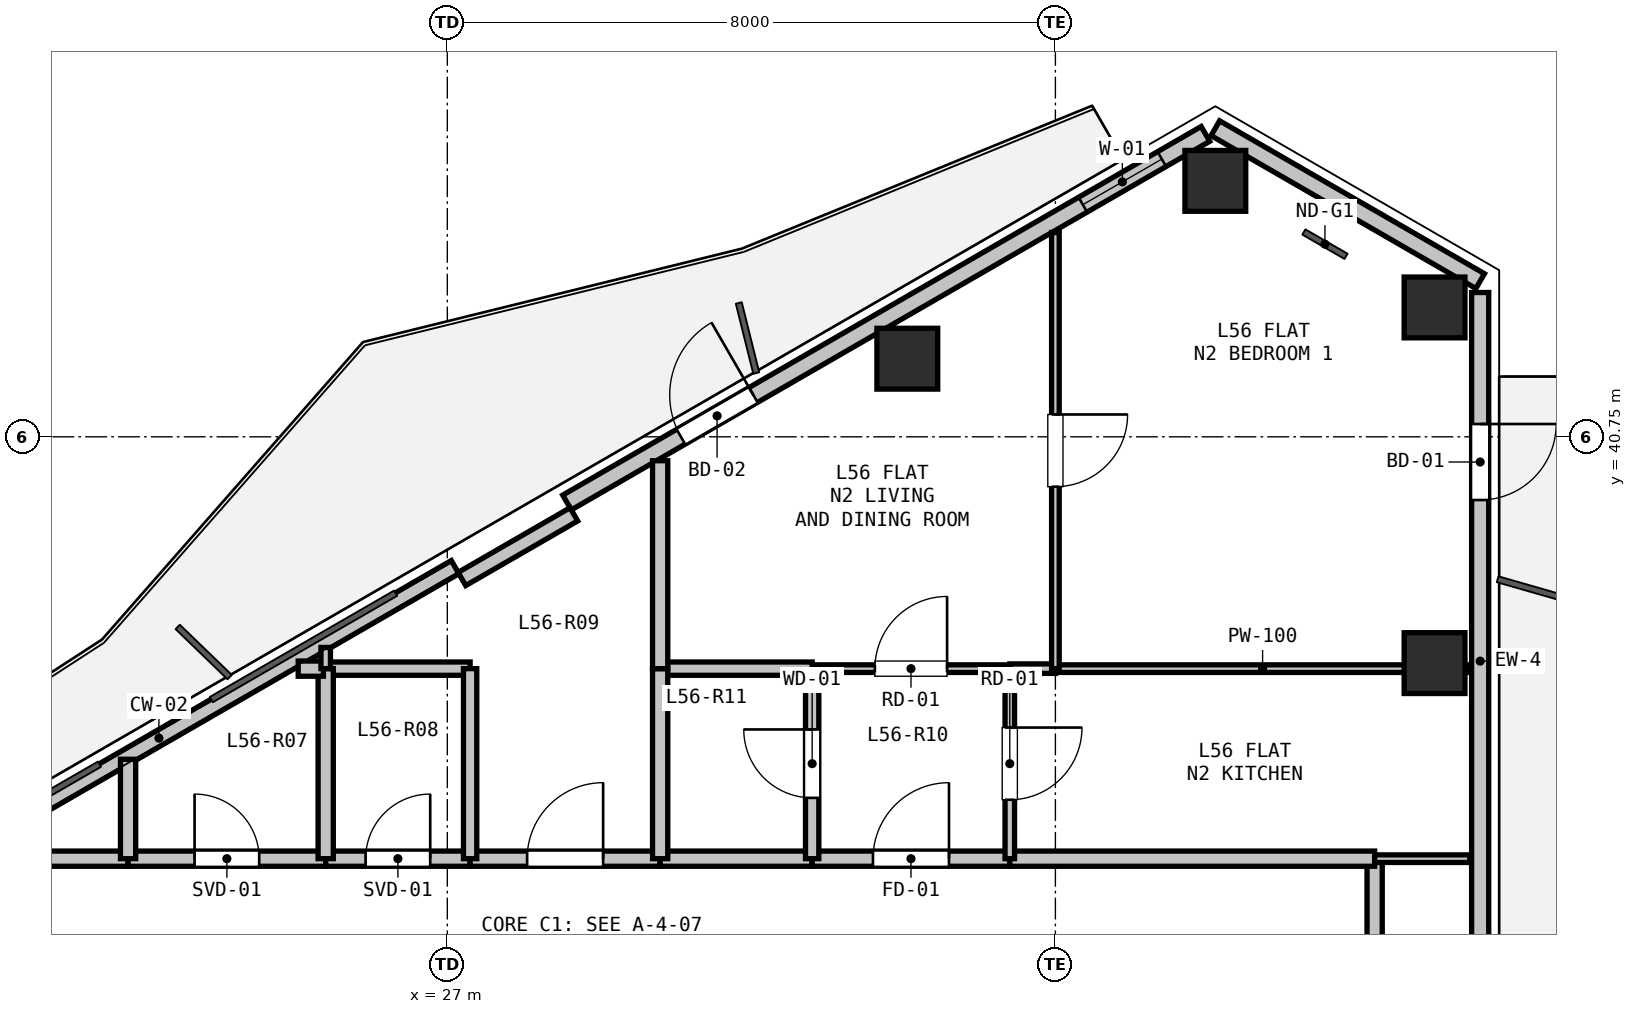
"""IFC4 building model, lengths in metres.
Left out: names, types, materials, properties, quantities, classifications, styles, units other than length and angle.
Written with IfcOpenShell. Run it as: python <this file> out.ifc"""

import sys

from ifc_helpers import new_model, si_unit, direction, frame, frame_2d, origin, origin_2d, place, context, subcontext, project, spatial, rectangle, hollow_rectangle, extrude, element, fill, save


model = new_model("IFC4")
c1 = context("Model", 3, precision=1e-05, world=origin(), true_north=direction((0.0, 1.0)))
c2 = subcontext(c1, "Body", "Model", "MODEL_VIEW")
j1 = project(units=[si_unit("LENGTHUNIT", "METRE"), si_unit("PLANEANGLEUNIT", "RADIAN")], contexts=[c1])
p1 = place(None, origin())
s1 = spatial("IfcSite", under=j1, at=p1, CompositionType="ELEMENT")
p2 = place(p1, origin())
s2 = spatial("IfcBuilding", under=s1, at=p2, CompositionType="ELEMENT")
p3 = place(p2, frame((0.0, 0.0, 201.9)))
s3 = spatial("IfcBuildingStorey", under=s2, at=p3, CompositionType="ELEMENT", Elevation=201.9)
for number, where, z_axis, x_axis in (
    (1, (33.052, 41.778, 0.0), (0.0, 0.0, 1.0), (1.0, 0.0, 0.0)),
    (2, (37.104, 44.117, 0.0), (0.0, 0.0, 1.0), (1.0, 0.0, 0.0)),
    (3, (39.988, 42.452, 0.0), (0.0, 0.0, 1.0), (1.0, 0.0, 0.0)),
    (4, (39.988, 37.773, 0.0), (0.0, 0.0, 1.0), (1.0, 0.0, 0.0)),
):
    element("IfcColumn", number, at=place(p3, frame(where, z_axis=z_axis, x_axis=x_axis)), inside=s3, PredefinedType="COLUMN", context=c2, shape_type="SweptSolid", body=[
        extrude(hollow_rectangle(XDim=0.8, YDim=0.8, WallThickness=0.025, at=origin_2d()), origin(), (0.0, 0.0, 1.0), 3.3),
    ])
p4 = place(p3, frame((37.104, 44.81, 0.0), z_axis=(0.0, 0.0, 1.0), x_axis=(0.866023907196, -0.500002592159, 0.0)))
e5 = element("IfcWall", 5, at=p4, inside=s3, PredefinedType="SOLIDWALL", context=c2, shape_type="SweptSolid", body=[
    extrude(rectangle(XDim=4.023, YDim=0.225, at=frame_2d((2.012, 0.0))), origin(), (0.0, 0.0, 1.0), 2.69),
])
p5 = place(p3, frame((19.309, 34.536, 0.0), z_axis=(0.0, 0.0, 1.0), x_axis=(0.866020680503, 0.500008180874, 0.0)))
e6 = element("IfcWall", 6, at=p5, inside=s3, PredefinedType="PARAPET", context=c2, shape_type="SweptSolid", body=[
    extrude(rectangle(XDim=8.999, YDim=0.2, at=frame_2d((4.5, 0.0))), origin(), (0.0, 0.0, 1.0), 0.2),
])
p6 = place(p3, frame((28.575, 39.885, 0.0), z_axis=(0.0, 0.0, 1.0), x_axis=(0.866016233231, 0.500015883528, 0.0)))
e7 = element("IfcWall", 7, at=p6, inside=s3, PredefinedType="SOLIDWALL", context=c2, shape_type="SweptSolid", body=[
    extrude(rectangle(XDim=9.699, YDim=0.225, at=frame_2d((4.85, 0.0))), origin(), (0.0, 0.0, 1.0), 2.69),
])
p7 = place(p6, frame((1.73, 0.0, 0.0)))
e8 = element("IfcOpeningElement", 8, at=p7, cuts=e7, PredefinedType="OPENING", context=c2, shape_type="SweptSolid", body=[
    extrude(rectangle(XDim=1.1, YDim=2.1, at=frame_2d((0.55, 1.05))), frame((0.0, 0.123, 0.0), z_axis=(0.0, -1.0, 0.0), x_axis=(1.0, 0.0, 0.0)), (0.0, 0.0, 1.0), 0.245),
])
p8 = place(p6, frame((7.836, 0.0, 0.9)))
e9 = element("IfcOpeningElement", 9, at=p8, cuts=e7, PredefinedType="OPENING", context=c2, shape_type="SweptSolid", body=[
    extrude(rectangle(XDim=1.2, YDim=1.4, at=frame_2d((0.6, 0.7))), frame((0.0, 0.123, 0.0), z_axis=(0.0, -1.0, 0.0), x_axis=(1.0, 0.0, 0.0)), (0.0, 0.0, 1.0), 0.245),
])
p9 = place(p3, frame((27.192, 38.88, 0.0), z_axis=(0.0, 0.0, 1.0), x_axis=(0.866025371046, 0.500000056704, 0.0)))
e10 = element("IfcWall", 10, at=p9, inside=s3, PredefinedType="PARAPET", context=c2, shape_type="SweptSolid", body=[
    extrude(rectangle(XDim=1.7, YDim=0.2, at=frame_2d((0.85, 0.0))), origin(), (0.0, 0.0, 1.0), 2.69),
])
p10 = place(p3, frame((40.588, 42.648, 0.0), z_axis=(0.0, 0.0, 1.0), x_axis=(0.0, -1.0, 0.0)))
e11 = element("IfcWall", 11, at=p10, inside=s3, PredefinedType="SOLIDWALL", context=c2, shape_type="SweptSolid", body=[
    extrude(rectangle(XDim=9.699, YDim=0.225, at=frame_2d((4.85, 0.0))), origin(), (0.0, 0.0, 1.0), 2.69),
])
p11 = place(p10, frame((1.73, 0.0, 0.0)))
e12 = element("IfcOpeningElement", 12, at=p11, cuts=e11, PredefinedType="OPENING", context=c2, shape_type="SweptSolid", body=[
    extrude(rectangle(XDim=1.0, YDim=2.1, at=frame_2d((0.5, 1.05))), frame((0.0, 0.123, 0.0), z_axis=(0.0, -1.0, 0.0), x_axis=(1.0, 0.0, 0.0)), (0.0, 0.0, 1.0), 0.245),
])
p12 = place(p3, frame((39.2, 35.2, 0.0), z_axis=(0.0, 0.0, 1.0), x_axis=(0.0, -1.0, 0.0)))
e13 = element("IfcWall", 13, at=p12, inside=s3, PredefinedType="PARTITIONING", context=c2, shape_type="SweptSolid", body=[
    extrude(rectangle(XDim=1.6, YDim=0.2, at=frame_2d((0.8, 0.0))), origin(), (0.0, 0.0, 1.0), 3.07),
])
p13 = place(p3, frame((20.528, 35.2, 0.0), z_axis=(0.0, 0.0, 1.0), x_axis=(1.0, 0.0, 0.0)))
e14 = element("IfcWall", 14, at=p13, inside=s3, PredefinedType="PARTITIONING", context=c2, shape_type="SweptSolid", body=[
    extrude(rectangle(XDim=2.272, YDim=0.2, at=frame_2d((1.136, 0.0))), origin(), (0.0, 0.0, 1.0), 2.365),
])
p14 = place(p3, frame((22.8, 35.2, 0.0), z_axis=(0.0, 0.0, 1.0), x_axis=(1.0, 0.0, 0.0)))
e15 = element("IfcWall", 15, at=p14, inside=s3, PredefinedType="PARTITIONING", context=c2, shape_type="SweptSolid", body=[
    extrude(rectangle(XDim=2.6, YDim=0.2, at=frame_2d((1.3, 0.0))), origin(), (0.0, 0.0, 1.0), 3.07),
])
p15 = place(p14, frame((0.875, 0.0, 0.0)))
e16 = element("IfcOpeningElement", 16, at=p15, cuts=e15, PredefinedType="OPENING", context=c2, shape_type="SweptSolid", body=[
    extrude(rectangle(XDim=0.85, YDim=2.1, at=frame_2d((0.425, 1.05))), frame((0.0, 0.11, 0.0), z_axis=(0.0, -1.0, 0.0), x_axis=(1.0, 0.0, 0.0)), (0.0, 0.0, 1.0), 0.22),
])
p16 = place(p3, frame((25.4, 35.2, 0.0), z_axis=(0.0, 0.0, 1.0), x_axis=(1.0, 0.0, 0.0)))
e17 = element("IfcWall", 17, at=p16, inside=s3, PredefinedType="PARTITIONING", context=c2, shape_type="SweptSolid", body=[
    extrude(rectangle(XDim=1.9, YDim=0.2, at=frame_2d((0.95, 0.0))), origin(), (0.0, 0.0, 1.0), 3.07),
])
p17 = place(p16, frame((0.525, 0.0, 0.0)))
e18 = element("IfcOpeningElement", 18, at=p17, cuts=e17, PredefinedType="OPENING", context=c2, shape_type="SweptSolid", body=[
    extrude(rectangle(XDim=0.85, YDim=2.1, at=frame_2d((0.425, 1.05))), frame((0.0, 0.11, 0.0), z_axis=(0.0, -1.0, 0.0), x_axis=(1.0, 0.0, 0.0)), (0.0, 0.0, 1.0), 0.22),
])
p18 = place(p3, frame((27.3, 35.2, 0.0), z_axis=(0.0, 0.0, 1.0), x_axis=(1.0, 0.0, 0.0)))
e19 = element("IfcWall", 19, at=p18, inside=s3, PredefinedType="PARTITIONING", context=c2, shape_type="SweptSolid", body=[
    extrude(rectangle(XDim=2.5, YDim=0.2, at=frame_2d((1.25, 0.0))), origin(), (0.0, 0.0, 1.0), 3.07),
])
p19 = place(p18, frame((0.75, 0.0, 0.0)))
e20 = element("IfcOpeningElement", 20, at=p19, cuts=e19, PredefinedType="OPENING", context=c2, shape_type="SweptSolid", body=[
    extrude(rectangle(XDim=1.0, YDim=2.15, at=frame_2d((0.5, 1.075))), frame((0.0, 0.11, 0.0), z_axis=(0.0, -1.0, 0.0), x_axis=(1.0, 0.0, 0.0)), (0.0, 0.0, 1.0), 0.22),
])
p20 = place(p3, frame((29.8, 35.2, 0.0), z_axis=(0.0, 0.0, 1.0), x_axis=(1.0, 0.0, 0.0)))
e21 = element("IfcWall", 21, at=p20, inside=s3, PredefinedType="PARTITIONING", context=c2, shape_type="SweptSolid", body=[
    extrude(rectangle(XDim=2.0, YDim=0.2, at=frame_2d((1.0, 0.0))), origin(), (0.0, 0.0, 1.0), 3.07),
])
p21 = place(p3, frame((31.8, 35.2, 0.0), z_axis=(0.0, 0.0, 1.0), x_axis=(1.0, 0.0, 0.0)))
e22 = element("IfcWall", 22, at=p21, inside=s3, PredefinedType="PARTITIONING", context=c2, shape_type="SweptSolid", body=[
    extrude(rectangle(XDim=2.6, YDim=0.2, at=frame_2d((1.3, 0.0))), origin(), (0.0, 0.0, 1.0), 3.07),
])
p22 = place(p21, frame((0.8, 0.0, 0.0)))
e23 = element("IfcOpeningElement", 23, at=p22, cuts=e22, PredefinedType="OPENING", context=c2, shape_type="SweptSolid", body=[
    extrude(rectangle(XDim=1.0, YDim=2.15, at=frame_2d((0.5, 1.075))), frame((0.0, 0.11, 0.0), z_axis=(0.0, -1.0, 0.0), x_axis=(1.0, 0.0, 0.0)), (0.0, 0.0, 1.0), 0.22),
])
p23 = place(p3, frame((34.4, 35.2, 0.0), z_axis=(0.0, 0.0, 1.0), x_axis=(1.0, 0.0, 0.0)))
e24 = element("IfcWall", 24, at=p23, inside=s3, PredefinedType="PARTITIONING", context=c2, shape_type="SweptSolid", body=[
    extrude(rectangle(XDim=4.8, YDim=0.2, at=frame_2d((2.4, 0.0))), origin(), (0.0, 0.0, 1.0), 2.518),
])
p24 = place(p3, frame((31.8, 37.7, 0.0), z_axis=(0.0, 0.0, 1.0), x_axis=(1.0, 0.0, 0.0)))
e25 = element("IfcWall", 25, at=p24, inside=s3, PredefinedType="PARTITIONING", context=c2, shape_type="SweptSolid", body=[
    extrude(rectangle(XDim=2.6, YDim=0.1, at=frame_2d((1.3, 0.0))), origin(), (0.0, 0.0, 1.0), 3.07),
])
p25 = place(p24, frame((0.825, 0.0, 0.0)))
e26 = element("IfcOpeningElement", 26, at=p25, cuts=e25, PredefinedType="OPENING", context=c2, shape_type="SweptSolid", body=[
    extrude(rectangle(XDim=0.95, YDim=2.1, at=frame_2d((0.475, 1.05))), frame((0.0, 0.06, 0.0), z_axis=(0.0, -1.0, 0.0), x_axis=(1.0, 0.0, 0.0)), (0.0, 0.0, 1.0), 0.12),
])
p26 = place(p3, frame((34.4, 37.7, 0.0), z_axis=(0.0, 0.0, 1.0), x_axis=(0.0, -1.0, 0.0)))
e27 = element("IfcWall", 27, at=p26, inside=s3, PredefinedType="PARTITIONING", context=c2, shape_type="SweptSolid", body=[
    extrude(rectangle(XDim=2.5, YDim=0.125, at=frame_2d((1.25, 0.0))), origin(), (0.0, 0.0, 1.0), 3.07),
])
p27 = place(p26, frame((0.775, 0.0, 0.0)))
e28 = element("IfcOpeningElement", 28, at=p27, cuts=e27, PredefinedType="OPENING", context=c2, shape_type="SweptSolid", body=[
    extrude(rectangle(XDim=0.95, YDim=2.1, at=frame_2d((0.475, 1.05))), frame((0.0, 0.073, 0.0), z_axis=(0.0, -1.0, 0.0), x_axis=(1.0, 0.0, 0.0)), (0.0, 0.0, 1.0), 0.145),
])
p28 = place(p3, frame((31.8, 35.2, 0.0), z_axis=(0.0, 0.0, 1.0), x_axis=(0.0, 1.0, 0.0)))
e29 = element("IfcWall", 29, at=p28, inside=s3, PredefinedType="PLUMBINGWALL", context=c2, shape_type="SweptSolid", body=[
    extrude(rectangle(XDim=2.5, YDim=0.175, at=frame_2d((1.25, 0.0))), origin(), (0.0, 0.0, 1.0), 3.07),
])
p29 = place(p28, frame((0.8, 0.0, 0.0)))
e30 = element("IfcOpeningElement", 30, at=p29, cuts=e29, PredefinedType="OPENING", context=c2, shape_type="SweptSolid", body=[
    extrude(rectangle(XDim=0.9, YDim=2.1, at=frame_2d((0.45, 1.05))), frame((0.0, 0.097, 0.0), z_axis=(0.0, -1.0, 0.0), x_axis=(1.0, 0.0, 0.0)), (0.0, 0.0, 1.0), 0.195),
])
p30 = place(p3, frame((25.4, 37.7, 0.0), z_axis=(0.0, 0.0, 1.0), x_axis=(1.0, 0.0, 0.0)))
e31 = element("IfcWall", 31, at=p30, inside=s3, PredefinedType="PLUMBINGWALL", context=c2, shape_type="SweptSolid", body=[
    extrude(rectangle(XDim=1.9, YDim=0.175, at=frame_2d((0.95, 0.0))), origin(), (0.0, 0.0, 1.0), 2.365),
])
p31 = place(p3, frame((27.3, 37.7, 0.0), z_axis=(0.0, 0.0, 1.0), x_axis=(0.0, -1.0, 0.0)))
e32 = element("IfcWall", 32, at=p31, inside=s3, PredefinedType="PLUMBINGWALL", context=c2, shape_type="SweptSolid", body=[
    extrude(rectangle(XDim=2.5, YDim=0.175, at=frame_2d((1.25, 0.0))), origin(), (0.0, 0.0, 1.0), 3.07),
])
p32 = place(p3, frame((25.4, 35.2, 0.0), z_axis=(0.0, 0.0, 1.0), x_axis=(0.0, 1.0, 0.0)))
e33 = element("IfcWall", 33, at=p32, inside=s3, PredefinedType="PARTITIONING", context=c2, shape_type="SweptSolid", body=[
    extrude(rectangle(XDim=2.5, YDim=0.2, at=frame_2d((1.25, 0.0))), origin(), (0.0, 0.0, 1.0), 2.365),
])
p33 = place(p3, frame((29.8, 37.7, 0.0), z_axis=(0.0, 0.0, 1.0), x_axis=(1.0, 0.0, 0.0)))
e34 = element("IfcWall", 34, at=p33, inside=s3, PredefinedType="PLUMBINGWALL", context=c2, shape_type="SweptSolid", body=[
    extrude(rectangle(XDim=2.0, YDim=0.175, at=frame_2d((1.0, 0.0))), origin(), (0.0, 0.0, 1.0), 3.07),
])
p34 = place(p3, frame((29.8, 35.2, 0.0), z_axis=(0.0, 0.0, 1.0), x_axis=(0.0, 1.0, 0.0)))
e35 = element("IfcWall", 35, at=p34, inside=s3, PredefinedType="PARTITIONING", context=c2, shape_type="SweptSolid", body=[
    extrude(rectangle(XDim=2.5, YDim=0.2, at=frame_2d((1.25, 0.0))), origin(), (0.0, 0.0, 1.0), 3.07),
])
p35 = place(p3, frame((40.452, 35.2, 0.0), z_axis=(0.0, 0.0, 1.0), x_axis=(-1.0, 0.0, 0.0)))
e36 = element("IfcWall", 36, at=p35, inside=s3, PredefinedType="PARTITIONING", context=c2, shape_type="SweptSolid", body=[
    extrude(rectangle(XDim=1.252, YDim=0.1, at=frame_2d((0.626, 0.0))), origin(), (0.0, 0.0, 1.0), 2.365),
])
p36 = place(p3, frame((34.4, 37.7, 0.0), z_axis=(0.0, 0.0, 1.0), x_axis=(1.0, 0.0, 0.0)))
e37 = element("IfcWall", 37, at=p36, inside=s3, PredefinedType="PARTITIONING", context=c2, shape_type="SweptSolid", body=[
    extrude(rectangle(XDim=0.6, YDim=0.125, at=frame_2d((0.3, 0.0))), origin(), (0.0, 0.0, 1.0), 3.07),
])
p37 = place(p3, frame((35.0, 37.7, 0.0), z_axis=(0.0, 0.0, 1.0), x_axis=(1.0, 0.0, 0.0)))
e38 = element("IfcWall", 38, at=p37, inside=s3, PredefinedType="PARTITIONING", context=c2, shape_type="SweptSolid", body=[
    extrude(rectangle(XDim=5.452, YDim=0.1, at=frame_2d((2.726, 0.0))), origin(), (0.0, 0.0, 1.0), 2.518),
])
p38 = place(p3, frame((25.038, 37.7, 0.0), z_axis=(0.0, 0.0, 1.0), x_axis=(1.0, 0.0, 0.0)))
e39 = element("IfcWall", 39, at=p38, inside=s3, PredefinedType="PARTITIONING", context=c2, shape_type="SweptSolid", body=[
    extrude(rectangle(XDim=0.332, YDim=0.2, at=frame_2d((0.166, 0.0))), origin(), (0.0, 0.0, 1.0), 3.07),
])
p39 = place(p3, frame((22.8, 35.2, 0.0), z_axis=(0.0, 0.0, 1.0), x_axis=(0.0, 1.0, 0.0)))
e40 = element("IfcWall", 40, at=p39, inside=s3, PredefinedType="PARTITIONING", context=c2, shape_type="SweptSolid", body=[
    extrude(rectangle(XDim=1.308, YDim=0.2, at=frame_2d((0.654, 0.0))), origin(), (0.0, 0.0, 1.0), 2.365),
])
p40 = place(p3, frame((29.8, 40.435, 0.0), z_axis=(0.0, 0.0, 1.0), x_axis=(0.0, -1.0, 0.0)))
e41 = element("IfcWall", 41, at=p40, inside=s3, PredefinedType="PARTITIONING", context=c2, shape_type="SweptSolid", body=[
    extrude(rectangle(XDim=2.735, YDim=0.2, at=frame_2d((1.368, 0.0))), origin(), (0.0, 0.0, 1.0), 2.365),
])
p41 = place(p3, frame((25.4, 37.7, 0.0), z_axis=(0.0, 0.0, 1.0), x_axis=(0.0, 1.0, 0.0)))
e42 = element("IfcWall", 42, at=p41, inside=s3, PredefinedType="PARTITIONING", context=c2, shape_type="SweptSolid", body=[
    extrude(rectangle(XDim=0.279, YDim=0.125, at=frame_2d((0.139, 0.0))), origin(), (0.0, 0.0, 1.0), 3.07),
])
p42 = place(p3, frame((35.0, 43.438, 0.0), z_axis=(0.0, 0.0, 1.0), x_axis=(0.0, -1.0, 0.0)))
e43 = element("IfcWall", 43, at=p42, inside=s3, PredefinedType="PARTITIONING", context=c2, shape_type="SweptSolid", body=[
    extrude(rectangle(XDim=5.738, YDim=0.1, at=frame_2d((2.869, 0.0))), origin(), (0.0, 0.0, 1.0), 2.795),
])
p43 = place(p42, frame((2.394, 0.0, 0.0)))
e44 = element("IfcOpeningElement", 44, at=p43, cuts=e43, PredefinedType="OPENING", context=c2, shape_type="SweptSolid", body=[
    extrude(rectangle(XDim=0.95, YDim=2.1, at=frame_2d((0.475, 1.05))), frame((0.0, 0.06, 0.0), z_axis=(0.0, -1.0, 0.0), x_axis=(1.0, 0.0, 0.0)), (0.0, 0.0, 1.0), 0.12),
])
p44 = place(p7, origin())
e45 = element("IfcDoor", 45, at=p44, inside=s3, OperationType="SINGLE_SWING_RIGHT", PredefinedType="DOOR", context=c2, shape_type="SweptSolid", body=[
    extrude(rectangle(XDim=1.1, YDim=2.1, at=frame_2d((0.55, 1.05))), frame((0.0, 0.025, 0.0), z_axis=(0.0, -1.0, 0.0), x_axis=(1.0, 0.0, 0.0)), (0.0, 0.0, 1.0), 0.05),
])
fill(e8, e45)
p45 = place(p8, origin())
e46 = element("IfcWindow", 46, at=p45, inside=s3, PartitioningType="SINGLE_PANEL", PredefinedType="WINDOW", context=c2, shape_type="SweptSolid", body=[
    extrude(rectangle(XDim=1.2, YDim=1.4, at=frame_2d((0.6, 0.7))), frame((0.0, 0.03, 0.0), z_axis=(0.0, -1.0, 0.0), x_axis=(1.0, 0.0, 0.0)), (0.0, 0.0, 1.0), 0.06),
])
fill(e9, e46)
p46 = place(p11, origin())
e47 = element("IfcDoor", 47, at=p46, inside=s3, OperationType="SINGLE_SWING_LEFT", PredefinedType="DOOR", context=c2, shape_type="SweptSolid", body=[
    extrude(rectangle(XDim=1.0, YDim=2.1, at=frame_2d((0.5, 1.05))), frame((0.0, 0.025, 0.0), z_axis=(0.0, -1.0, 0.0), x_axis=(1.0, 0.0, 0.0)), (0.0, 0.0, 1.0), 0.05),
])
fill(e12, e47)
p47 = place(p22, origin())
e48 = element("IfcDoor", 48, at=p47, inside=s3, OperationType="SINGLE_SWING_RIGHT", PredefinedType="DOOR", context=c2, shape_type="SweptSolid", body=[
    extrude(rectangle(XDim=1.0, YDim=2.15, at=frame_2d((0.5, 1.075))), frame((0.0, 0.025, 0.0), z_axis=(0.0, -1.0, 0.0), x_axis=(1.0, 0.0, 0.0)), (0.0, 0.0, 1.0), 0.05),
])
fill(e23, e48)
p48 = place(p17, origin())
e49 = element("IfcDoor", 49, at=p48, inside=s3, OperationType="SINGLE_SWING_RIGHT", PredefinedType="DOOR", context=c2, shape_type="SweptSolid", body=[
    extrude(rectangle(XDim=0.85, YDim=2.1, at=frame_2d((0.425, 1.05))), frame((0.0, 0.025, 0.0), z_axis=(0.0, -1.0, 0.0), x_axis=(1.0, 0.0, 0.0)), (0.0, 0.0, 1.0), 0.05),
])
fill(e18, e49)
p49 = place(p15, origin())
e50 = element("IfcDoor", 50, at=p49, inside=s3, OperationType="SINGLE_SWING_LEFT", PredefinedType="DOOR", context=c2, shape_type="SweptSolid", body=[
    extrude(rectangle(XDim=0.85, YDim=2.1, at=frame_2d((0.425, 1.05))), frame((0.0, 0.025, 0.0), z_axis=(0.0, -1.0, 0.0), x_axis=(1.0, 0.0, 0.0)), (0.0, 0.0, 1.0), 0.05),
])
fill(e16, e50)
p50 = place(p19, origin())
e51 = element("IfcDoor", 51, at=p50, inside=s3, OperationType="SINGLE_SWING_RIGHT", PredefinedType="DOOR", context=c2, shape_type="SweptSolid", body=[
    extrude(rectangle(XDim=1.0, YDim=2.15, at=frame_2d((0.5, 1.075))), frame((0.0, 0.025, 0.0), z_axis=(0.0, -1.0, 0.0), x_axis=(1.0, 0.0, 0.0)), (0.0, 0.0, 1.0), 0.05),
])
fill(e20, e51)
p51 = place(p29, origin())
e52 = element("IfcDoor", 52, at=p51, inside=s3, OperationType="SINGLE_SWING_RIGHT", PredefinedType="DOOR", context=c2, shape_type="SweptSolid", body=[
    extrude(rectangle(XDim=0.9, YDim=2.1, at=frame_2d((0.45, 1.05))), frame((0.0, 0.025, 0.0), z_axis=(0.0, -1.0, 0.0), x_axis=(1.0, 0.0, 0.0)), (0.0, 0.0, 1.0), 0.05),
])
fill(e30, e52)
p52 = place(p27, origin())
e53 = element("IfcDoor", 53, at=p52, inside=s3, OperationType="SINGLE_SWING_LEFT", PredefinedType="DOOR", context=c2, shape_type="SweptSolid", body=[
    extrude(rectangle(XDim=0.95, YDim=2.1, at=frame_2d((0.475, 1.05))), frame((0.0, 0.025, 0.0), z_axis=(0.0, -1.0, 0.0), x_axis=(1.0, 0.0, 0.0)), (0.0, 0.0, 1.0), 0.05),
])
fill(e28, e53)
p53 = place(p25, origin())
e54 = element("IfcDoor", 54, at=p53, inside=s3, OperationType="SINGLE_SWING_RIGHT", PredefinedType="DOOR", context=c2, shape_type="SweptSolid", body=[
    extrude(rectangle(XDim=0.95, YDim=2.1, at=frame_2d((0.475, 1.05))), frame((0.0, 0.025, 0.0), z_axis=(0.0, -1.0, 0.0), x_axis=(1.0, 0.0, 0.0)), (0.0, 0.0, 1.0), 0.05),
])
fill(e26, e54)
p54 = place(p43, origin())
e55 = element("IfcDoor", 55, at=p54, inside=s3, OperationType="SINGLE_SWING_LEFT", PredefinedType="DOOR", context=c2, shape_type="SweptSolid", body=[
    extrude(rectangle(XDim=0.95, YDim=2.1, at=frame_2d((0.475, 1.05))), frame((0.0, 0.025, 0.0), z_axis=(0.0, -1.0, 0.0), x_axis=(1.0, 0.0, 0.0)), (0.0, 0.0, 1.0), 0.05),
])
fill(e44, e55)
save(model, sys.argv[1])
